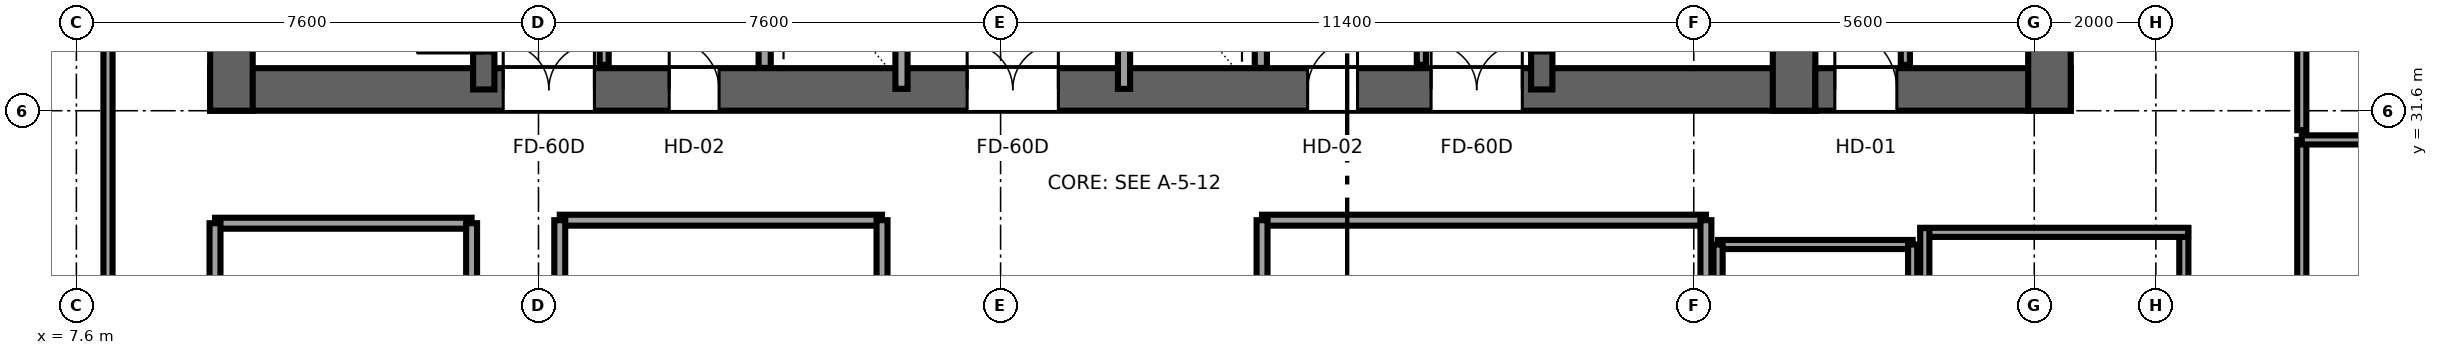
"""IFC4 building model, lengths in metres.
Left out: names, types, materials, properties, quantities, classifications, styles, units other than length and angle.
Written with IfcOpenShell. Run it as: python <this file> out.ifc"""

import sys

from ifc_helpers import new_model, si_unit, direction, frame, frame_2d, origin, place, context, subcontext, project, spatial, rectangle, extrude, source, transform, mapped, element, fill, save


model = new_model("IFC4")
c1 = context("Model", 3, precision=1e-05, world=origin(), true_north=direction((0.0, 1.0)))
c2 = subcontext(c1, "Body", "Model", "MODEL_VIEW")
j1 = project(units=[si_unit("LENGTHUNIT", "METRE"), si_unit("PLANEANGLEUNIT", "RADIAN")], contexts=[c1])
p1 = place(None, origin())
s1 = spatial("IfcSite", under=j1, at=p1, CompositionType="ELEMENT")
p2 = place(p1, origin())
s2 = spatial("IfcBuilding", under=s1, at=p2, CompositionType="ELEMENT")
p3 = place(p2, frame((0.0, 0.0, 115.1)))
s3 = spatial("IfcBuildingStorey", under=s2, at=p3, CompositionType="ELEMENT", Elevation=115.1)
p4 = place(p3, frame((9.8, 31.95, 0.0), z_axis=(0.0, 0.0, 1.0), x_axis=(1.0, 0.0, 0.0)))
e1 = element("IfcWall", 1, at=p4, inside=s3, PredefinedType="SHEAR", context=c2, shape_type="SweptSolid", body=[
    extrude(rectangle(XDim=26.4, YDim=0.7, at=frame_2d((13.2, 0.0))), origin(), (0.0, 0.0, 1.0), 3.55),
])
p5 = place(p4, frame((6.32, 0.0, 0.0), z_axis=(0.0, 0.0, 1.0), x_axis=(-1.0, 0.0, 0.0)))
e2 = element("IfcOpeningElement", 2, at=p5, cuts=e1, PredefinedType="OPENING", context=c2, shape_type="SweptSolid", body=[
    extrude(rectangle(XDim=1.5, YDim=2.04, at=frame_2d((0.75, 1.02))), frame((0.0, 0.36, 0.0), z_axis=(0.0, -1.0, 0.0), x_axis=(1.0, 0.0, 0.0)), (0.0, 0.0, 1.0), 0.72),
])
p6 = place(p4, frame((13.95, 0.0, 0.0), z_axis=(0.0, 0.0, 1.0), x_axis=(-1.0, 0.0, 0.0)))
e3 = element("IfcOpeningElement", 3, at=p6, cuts=e1, PredefinedType="OPENING", context=c2, shape_type="SweptSolid", body=[
    extrude(rectangle(XDim=1.5, YDim=2.04, at=frame_2d((0.75, 1.02))), frame((0.0, 0.36, 0.0), z_axis=(0.0, -1.0, 0.0), x_axis=(1.0, 0.0, 0.0)), (0.0, 0.0, 1.0), 0.72),
])
p7 = place(p4, frame((21.58, 0.0, 0.0), z_axis=(0.0, 0.0, 1.0), x_axis=(-1.0, 0.0, 0.0)))
e4 = element("IfcOpeningElement", 4, at=p7, cuts=e1, PredefinedType="OPENING", context=c2, shape_type="SweptSolid", body=[
    extrude(rectangle(XDim=1.5, YDim=2.04, at=frame_2d((0.75, 1.02))), frame((0.0, 0.36, 0.0), z_axis=(0.0, -1.0, 0.0), x_axis=(1.0, 0.0, 0.0)), (0.0, 0.0, 1.0), 0.72),
])
p8 = place(p4, frame((8.37, 0.0, 0.0), z_axis=(0.0, 0.0, 1.0), x_axis=(-1.0, 0.0, 0.0)))
e5 = element("IfcOpeningElement", 5, at=p8, cuts=e1, PredefinedType="OPENING", context=c2, shape_type="SweptSolid", body=[
    extrude(rectangle(XDim=0.82, YDim=2.01, at=frame_2d((0.41, 1.005))), frame((0.0, 0.36, 0.0), z_axis=(0.0, -1.0, 0.0), x_axis=(1.0, 0.0, 0.0)), (0.0, 0.0, 1.0), 0.72),
])
p9 = place(p4, frame((18.87, 0.0, 0.0), z_axis=(0.0, 0.0, 1.0), x_axis=(-1.0, 0.0, 0.0)))
e6 = element("IfcOpeningElement", 6, at=p9, cuts=e1, PredefinedType="OPENING", context=c2, shape_type="SweptSolid", body=[
    extrude(rectangle(XDim=0.82, YDim=2.01, at=frame_2d((0.41, 1.005))), frame((0.0, 0.36, 0.0), z_axis=(0.0, -1.0, 0.0), x_axis=(1.0, 0.0, 0.0)), (0.0, 0.0, 1.0), 0.72),
])
for number, where, z_axis, x_axis in (
    (7, (10.15, 31.6, 0.0), (0.0, 0.0, 1.0), (0.0, 1.0, 0.0)),
    (8, (35.85, 31.6, 0.0), (0.0, 0.0, 1.0), (0.0, 1.0, 0.0)),
):
    element("IfcWall", number, at=place(p3, frame(where, z_axis=z_axis, x_axis=x_axis)), inside=s3, PredefinedType="SHEAR", context=c2, shape_type="SweptSolid", body=[
        extrude(rectangle(XDim=13.6, YDim=0.7, at=frame_2d((6.8, 0.0))), origin(), (0.0, 0.0, 1.0), 3.55),
    ])
p10 = place(p3, frame((14.3, 31.95, 0.0), z_axis=(0.0, 0.0, 1.0), x_axis=(0.0, 1.0, 0.0)))
e9 = element("IfcWall", 9, at=p10, inside=s3, PredefinedType="SHEAR", context=c2, shape_type="SweptSolid", body=[
    extrude(rectangle(XDim=12.9, YDim=0.35, at=frame_2d((6.45, 0.0))), origin(), (0.0, 0.0, 1.0), 3.55),
])
p11 = place(p10, frame((0.6, 0.0, 0.0)))
e10 = element("IfcOpeningElement", 10, at=p11, cuts=e9, PredefinedType="OPENING", context=c2, shape_type="SweptSolid", body=[
    extrude(rectangle(XDim=1.1, YDim=2.12, at=frame_2d((0.55, 1.06))), frame((0.0, 0.185, 0.0), z_axis=(0.0, -1.0, 0.0), x_axis=(1.0, 0.0, 0.0)), (0.0, 0.0, 1.0), 0.37),
])
p12 = place(p3, frame((31.7, 31.95, 0.0), z_axis=(0.0, 0.0, 1.0), x_axis=(0.0, 1.0, 0.0)))
e11 = element("IfcWall", 11, at=p12, inside=s3, PredefinedType="SHEAR", context=c2, shape_type="SweptSolid", body=[
    extrude(rectangle(XDim=12.9, YDim=0.35, at=frame_2d((6.45, 0.0))), origin(), (0.0, 0.0, 1.0), 3.55),
])
p13 = place(p12, frame((1.7, 0.0, 0.0), z_axis=(0.0, 0.0, 1.0), x_axis=(-1.0, 0.0, 0.0)))
e12 = element("IfcOpeningElement", 12, at=p13, cuts=e11, PredefinedType="OPENING", context=c2, shape_type="SweptSolid", body=[
    extrude(rectangle(XDim=1.1, YDim=2.12, at=frame_2d((0.55, 1.06))), frame((0.0, 0.185, 0.0), z_axis=(0.0, -1.0, 0.0), x_axis=(1.0, 0.0, 0.0)), (0.0, 0.0, 1.0), 0.37),
])
p14 = place(p3, frame((36.2, 31.95, 0.0), z_axis=(0.0, 0.0, 1.0), x_axis=(1.0, 0.0, 0.0)))
e13 = element("IfcWall", 13, at=p14, inside=s3, PredefinedType="SHEAR", context=c2, shape_type="SweptSolid", body=[
    extrude(rectangle(XDim=4.2, YDim=0.7, at=frame_2d((2.1, 0.0))), origin(), (0.0, 0.0, 1.0), 3.55),
])
p15 = place(p14, frame((1.34, 0.0, 0.0), z_axis=(0.0, 0.0, 1.0), x_axis=(-1.0, 0.0, 0.0)))
e14 = element("IfcOpeningElement", 14, at=p15, cuts=e13, PredefinedType="OPENING", context=c2, shape_type="SweptSolid", body=[
    extrude(rectangle(XDim=1.02, YDim=2.03, at=frame_2d((0.51, 1.015))), frame((0.0, 0.36, 0.0), z_axis=(0.0, -1.0, 0.0), x_axis=(1.0, 0.0, 0.0)), (0.0, 0.0, 1.0), 0.72),
])
p16 = place(p3, frame((40.05, 31.6, 0.0), z_axis=(0.0, 0.0, 1.0), x_axis=(0.0, 1.0, 0.0)))
e15 = element("IfcWall", 15, at=p16, inside=s3, PredefinedType="SHEAR", context=c2, shape_type="SweptSolid", body=[
    extrude(rectangle(XDim=13.6, YDim=0.7, at=frame_2d((6.8, 0.0))), origin(), (0.0, 0.0, 1.0), 3.55),
])
for number, where, z_axis, x_axis in (
    (16, (18.92, 32.304, 0.0), (0.0, 0.0, 1.0), (0.0, 1.0, 0.0)),
    (17, (27.08, 32.304, 0.0), (0.0, 0.0, 1.0), (0.0, 1.0, 0.0)),
):
    element("IfcWall", number, at=place(p3, frame(where, z_axis=z_axis, x_axis=x_axis)), inside=s3, PredefinedType="SOLIDWALL", context=c2, shape_type="SweptSolid", body=[
        extrude(rectangle(XDim=3.846, YDim=0.2, at=frame_2d((1.923, 0.0))), origin(), (0.0, 0.0, 1.0), 3.37),
    ])
p17 = place(p3, frame((21.17, 31.96, 0.0), z_axis=(0.0, 0.0, 1.0), x_axis=(0.0, 1.0, 0.0)))
e18 = element("IfcWall", 18, at=p17, inside=s3, PredefinedType="SOLIDWALL", context=c2, shape_type="SweptSolid", body=[
    extrude(rectangle(XDim=12.58, YDim=0.2, at=frame_2d((6.29, 0.0))), origin(), (0.0, 0.0, 1.0), 3.37),
])
p18 = place(p17, frame((5.74, 0.0, 0.0)))
e19 = element("IfcOpeningElement", 19, at=p18, cuts=e18, PredefinedType="OPENING", context=c2, shape_type="SweptSolid", body=[
    extrude(rectangle(XDim=1.1, YDim=2.12, at=frame_2d((0.55, 1.06))), frame((0.0, 0.11, 0.0), z_axis=(0.0, -1.0, 0.0), x_axis=(1.0, 0.0, 0.0)), (0.0, 0.0, 1.0), 0.22),
])
p19 = place(p17, frame((8.24, 0.0, 0.0)))
e20 = element("IfcOpeningElement", 20, at=p19, cuts=e18, PredefinedType="OPENING", context=c2, shape_type="SweptSolid", body=[
    extrude(rectangle(XDim=1.1, YDim=2.12, at=frame_2d((0.55, 1.06))), frame((0.0, 0.11, 0.0), z_axis=(0.0, -1.0, 0.0), x_axis=(1.0, 0.0, 0.0)), (0.0, 0.0, 1.0), 0.22),
])
p20 = place(p3, frame((24.83, 31.96, 0.0), z_axis=(0.0, 0.0, 1.0), x_axis=(0.0, 1.0, 0.0)))
e21 = element("IfcWall", 21, at=p20, inside=s3, PredefinedType="SOLIDWALL", context=c2, shape_type="SweptSolid", body=[
    extrude(rectangle(XDim=12.58, YDim=0.2, at=frame_2d((6.29, 0.0))), origin(), (0.0, 0.0, 1.0), 3.37),
])
p21 = place(p20, frame((5.74, 0.0, 0.0)))
e22 = element("IfcOpeningElement", 22, at=p21, cuts=e21, PredefinedType="OPENING", context=c2, shape_type="SweptSolid", body=[
    extrude(rectangle(XDim=1.1, YDim=2.12, at=frame_2d((0.55, 1.06))), frame((0.0, 0.11, 0.0), z_axis=(0.0, -1.0, 0.0), x_axis=(1.0, 0.0, 0.0)), (0.0, 0.0, 1.0), 0.22),
])
p22 = place(p20, frame((8.24, 0.0, 0.0)))
e23 = element("IfcOpeningElement", 23, at=p22, cuts=e21, PredefinedType="OPENING", context=c2, shape_type="SweptSolid", body=[
    extrude(rectangle(XDim=1.1, YDim=2.12, at=frame_2d((0.55, 1.06))), frame((0.0, 0.11, 0.0), z_axis=(0.0, -1.0, 0.0), x_axis=(1.0, 0.0, 0.0)), (0.0, 0.0, 1.0), 0.22),
])
for number, where, z_axis, x_axis in (
    (24, (16.28, 32.355, 0.0), (0.0, 0.0, 1.0), (0.0, 1.0, 0.0)),
    (25, (29.72, 32.355, 0.0), (0.0, 0.0, 1.0), (0.0, 1.0, 0.0)),
):
    element("IfcWall", number, at=place(p3, frame(where, z_axis=z_axis, x_axis=x_axis)), inside=s3, PredefinedType="PARTITIONING", context=c2, shape_type="SweptSolid", body=[
        extrude(rectangle(XDim=0.865, YDim=0.15, at=frame_2d((0.433, 0.0))), origin(), (0.0, 0.0, 1.0), 3.37),
    ])
p23 = place(p3, frame((37.68, 32.355, 0.0), z_axis=(0.0, 0.0, 1.0), x_axis=(0.0, 1.0, 0.0)))
e26 = element("IfcWall", 26, at=p23, inside=s3, PredefinedType="PARTITIONING", context=c2, shape_type="SweptSolid", body=[
    extrude(rectangle(XDim=7.845, YDim=0.15, at=frame_2d((3.922, 0.0))), origin(), (0.0, 0.0, 1.0), 3.37),
])
p24 = place(p23, frame((3.413, 0.0, 0.0)))
e27 = element("IfcOpeningElement", 27, at=p24, cuts=e26, PredefinedType="OPENING", context=c2, shape_type="SweptSolid", body=[
    extrude(rectangle(XDim=1.02, YDim=2.03, at=frame_2d((0.51, 1.015))), frame((0.0, 0.085, 0.0), z_axis=(0.0, -1.0, 0.0), x_axis=(1.0, 0.0, 0.0)), (0.0, 0.0, 1.0), 0.17),
])
p25 = place(p3, frame((8.12, 21.78, 0.0), z_axis=(0.0, 0.0, 1.0), x_axis=(0.0, 1.0, 0.0)))
e28 = element("IfcWall", 28, at=p25, inside=s3, PredefinedType="PARTITIONING", context=c2, shape_type="SweptSolid", body=[
    extrude(rectangle(XDim=12.54, YDim=0.15, at=frame_2d((6.27, 0.0))), origin(), (0.0, 0.0, 1.0), 3.37),
])
p26 = place(p25, frame((5.78, 0.0, 0.0)))
e29 = element("IfcOpeningElement", 29, at=p26, cuts=e28, PredefinedType="OPENING", context=c2, shape_type="SweptSolid", body=[
    extrude(rectangle(XDim=0.98, YDim=2.12, at=frame_2d((0.49, 1.06))), frame((0.0, 0.085, 0.0), z_axis=(0.0, -1.0, 0.0), x_axis=(1.0, 0.0, 0.0)), (0.0, 0.0, 1.0), 0.17),
])
p27 = place(p3, frame((44.2, 21.78, 0.0), z_axis=(0.0, 0.0, 1.0), x_axis=(0.0, 1.0, 0.0)))
e30 = element("IfcWall", 30, at=p27, inside=s3, PredefinedType="PARTITIONING", context=c2, shape_type="SweptSolid", body=[
    extrude(rectangle(XDim=9.34, YDim=0.15, at=frame_2d((4.67, 0.0))), origin(), (0.0, 0.0, 1.0), 3.37),
])
p28 = place(p27, frame((4.18, 0.0, 0.0)))
e31 = element("IfcOpeningElement", 31, at=p28, cuts=e30, PredefinedType="OPENING", context=c2, shape_type="SweptSolid", body=[
    extrude(rectangle(XDim=0.98, YDim=2.12, at=frame_2d((0.49, 1.06))), frame((0.0, 0.085, 0.0), z_axis=(0.0, -1.0, 0.0), x_axis=(1.0, 0.0, 0.0)), (0.0, 0.0, 1.0), 0.17),
])
p29 = place(p3, frame((44.2, 31.12, 0.0), z_axis=(0.0, 0.0, 1.0), x_axis=(1.0, 0.0, 0.0)))
e32 = element("IfcWall", 32, at=p29, inside=s3, PredefinedType="PARTITIONING", context=c2, shape_type="SweptSolid", body=[
    extrude(rectangle(XDim=10.03, YDim=0.15, at=frame_2d((5.015, 0.0))), origin(), (0.0, 0.0, 1.0), 3.37),
])
p30 = place(p3, frame((44.2, 31.28, 0.0), z_axis=(0.0, 0.0, 1.0), x_axis=(0.0, 1.0, 0.0)))
e33 = element("IfcWall", 33, at=p30, inside=s3, PredefinedType="PARTITIONING", context=c2, shape_type="SweptSolid", body=[
    extrude(rectangle(XDim=6.24, YDim=0.15, at=frame_2d((3.12, 0.0))), origin(), (0.0, 0.0, 1.0), 3.37),
])
p31 = place(p30, frame((2.63, 0.0, 0.0)))
e34 = element("IfcOpeningElement", 34, at=p31, cuts=e33, PredefinedType="OPENING", context=c2, shape_type="SweptSolid", body=[
    extrude(rectangle(XDim=0.98, YDim=2.12, at=frame_2d((0.49, 1.06))), frame((0.0, 0.085, 0.0), z_axis=(0.0, -1.0, 0.0), x_axis=(1.0, 0.0, 0.0)), (0.0, 0.0, 1.0), 0.17),
])
p32 = place(p3, frame((42.26, 25.93, 0.0), z_axis=(0.0, 0.0, 1.0), x_axis=(0.0, 1.0, 0.0)))
e35 = element("IfcWall", 35, at=p32, inside=s3, PredefinedType="PARTITIONING", context=c2, shape_type="SweptSolid", body=[
    extrude(rectangle(XDim=3.74, YDim=0.15, at=frame_2d((1.87, 0.0))), origin(), (0.0, 0.0, 1.0), 3.37),
])
p33 = place(p32, frame((1.19, 0.0, 0.0)))
e36 = element("IfcOpeningElement", 36, at=p33, cuts=e35, PredefinedType="OPENING", context=c2, shape_type="SweptSolid", body=[
    extrude(rectangle(XDim=0.92, YDim=2.01, at=frame_2d((0.46, 1.005))), frame((0.0, 0.085, 0.0), z_axis=(0.0, -1.0, 0.0), x_axis=(1.0, 0.0, 0.0)), (0.0, 0.0, 1.0), 0.17),
])
p34 = place(p3, frame((37.93, 29.6, 0.0), z_axis=(0.0, 0.0, 1.0), x_axis=(1.0, 0.0, 0.0)))
e37 = element("IfcWall", 37, at=p34, inside=s3, PredefinedType="PARTITIONING", context=c2, shape_type="SweptSolid", body=[
    extrude(rectangle(XDim=4.4, YDim=0.15, at=frame_2d((2.2, 0.0))), origin(), (0.0, 0.0, 1.0), 3.37),
])
p35 = place(p3, frame((38.0, 25.93, 0.0), z_axis=(0.0, 0.0, 1.0), x_axis=(0.0, 1.0, 0.0)))
e38 = element("IfcWall", 38, at=p35, inside=s3, PredefinedType="PARTITIONING", context=c2, shape_type="SweptSolid", body=[
    extrude(rectangle(XDim=3.74, YDim=0.15, at=frame_2d((1.87, 0.0))), origin(), (0.0, 0.0, 1.0), 3.37),
])
p36 = place(p3, frame((9.88, 29.75, 0.0), z_axis=(0.0, 0.0, 1.0), x_axis=(1.0, 0.0, 0.0)))
e39 = element("IfcWall", 39, at=p36, inside=s3, PredefinedType="PARTITIONING", context=c2, shape_type="SweptSolid", body=[
    extrude(rectangle(XDim=4.22, YDim=0.18, at=frame_2d((2.11, 0.0))), origin(), (0.0, 0.0, 1.0), 3.37),
])
for number, where, z_axis, x_axis in (
    (40, (9.88, 21.7, 0.0), (0.0, 0.0, 1.0), (0.0, 1.0, 0.0)),
    (41, (14.1, 21.7, 0.0), (0.0, 0.0, 1.0), (0.0, 1.0, 0.0)),
):
    element("IfcWall", number, at=place(p3, frame(where, z_axis=z_axis, x_axis=x_axis)), inside=s3, PredefinedType="PARTITIONING", context=c2, shape_type="SweptSolid", body=[
        extrude(rectangle(XDim=8.05, YDim=0.18, at=frame_2d((4.025, 0.0))), origin(), (0.0, 0.0, 1.0), 3.37),
    ])
p37 = place(p3, frame((27.1, 29.8, 0.0), z_axis=(0.0, 0.0, 1.0), x_axis=(1.0, 0.0, 0.0)))
e42 = element("IfcWall", 42, at=p37, inside=s3, PredefinedType="PARTITIONING", context=c2, shape_type="SweptSolid", body=[
    extrude(rectangle(XDim=7.3, YDim=0.18, at=frame_2d((3.65, 0.0))), origin(), (0.0, 0.0, 1.0), 3.37),
])
for number, where, z_axis, x_axis in (
    (43, (27.1, 21.7, 0.0), (0.0, 0.0, 1.0), (0.0, 1.0, 0.0)),
    (44, (34.4, 21.7, 0.0), (0.0, 0.0, 1.0), (0.0, 1.0, 0.0)),
):
    element("IfcWall", number, at=place(p3, frame(where, z_axis=z_axis, x_axis=x_axis)), inside=s3, PredefinedType="PARTITIONING", context=c2, shape_type="SweptSolid", body=[
        extrude(rectangle(XDim=8.1, YDim=0.18, at=frame_2d((4.05, 0.0))), origin(), (0.0, 0.0, 1.0), 3.37),
    ])
p38 = place(p3, frame((15.55, 29.8, 0.0), z_axis=(0.0, 0.0, 1.0), x_axis=(1.0, 0.0, 0.0)))
e45 = element("IfcWall", 45, at=p38, inside=s3, PredefinedType="PARTITIONING", context=c2, shape_type="SweptSolid", body=[
    extrude(rectangle(XDim=5.3, YDim=0.18, at=frame_2d((2.65, 0.0))), origin(), (0.0, 0.0, 1.0), 3.37),
])
for number, where, z_axis, x_axis in (
    (46, (15.55, 21.7, 0.0), (0.0, 0.0, 1.0), (0.0, 1.0, 0.0)),
    (47, (20.85, 21.7, 0.0), (0.0, 0.0, 1.0), (0.0, 1.0, 0.0)),
):
    element("IfcWall", number, at=place(p3, frame(where, z_axis=z_axis, x_axis=x_axis)), inside=s3, PredefinedType="PARTITIONING", context=c2, shape_type="SweptSolid", body=[
        extrude(rectangle(XDim=8.1, YDim=0.18, at=frame_2d((4.05, 0.0))), origin(), (0.0, 0.0, 1.0), 3.37),
    ])
p39 = place(p3, frame((34.6, 29.4, 0.0), z_axis=(0.0, 0.0, 1.0), x_axis=(1.0, 0.0, 0.0)))
e48 = element("IfcWall", 48, at=p39, inside=s3, PredefinedType="PARTITIONING", context=c2, shape_type="SweptSolid", body=[
    extrude(rectangle(XDim=3.2, YDim=0.15, at=frame_2d((1.6, 0.0))), origin(), (0.0, 0.0, 1.0), 3.37),
])
for number, where, z_axis, x_axis in (
    (49, (34.6, 21.7, 0.0), (0.0, 0.0, 1.0), (0.0, 1.0, 0.0)),
    (50, (37.8, 21.7, 0.0), (0.0, 0.0, 1.0), (0.0, 1.0, 0.0)),
):
    element("IfcWall", number, at=place(p3, frame(where, z_axis=z_axis, x_axis=x_axis)), inside=s3, PredefinedType="PARTITIONING", context=c2, shape_type="SweptSolid", body=[
        extrude(rectangle(XDim=7.7, YDim=0.15, at=frame_2d((3.85, 0.0))), origin(), (0.0, 0.0, 1.0), 3.37),
    ])
m1 = source(origin(), c2, "Body", "SweptSolid", [
    extrude(rectangle(XDim=1.1, YDim=2.12, at=frame_2d((0.55, 1.06))), frame((0.0, 0.025, 0.0), z_axis=(0.0, -1.0, 0.0), x_axis=(1.0, 0.0, 0.0)), (0.0, 0.0, 1.0), 0.05),
])
p40 = place(p11, origin())
e51 = element("IfcDoor", 51, at=p40, inside=s3, OperationType="SINGLE_SWING_LEFT", PredefinedType="DOOR", context=c2, shape_type="MappedRepresentation", body=[
    mapped(m1, transform((0.0, 0.0, 0.0), x_axis=(1.0, 0.0, 0.0), y_axis=(0.0, 1.0, 0.0), z_axis=(0.0, 0.0, 1.0), scale=1.0)),
])
fill(e10, e51)
p41 = place(p13, origin())
e52 = element("IfcDoor", 52, at=p41, inside=s3, OperationType="SINGLE_SWING_RIGHT", PredefinedType="DOOR", context=c2, shape_type="MappedRepresentation", body=[
    mapped(m1, transform((0.0, 0.0, 0.0), x_axis=(1.0, 0.0, 0.0), y_axis=(0.0, 1.0, 0.0), z_axis=(0.0, 0.0, 1.0), scale=1.0)),
])
fill(e12, e52)
m2 = source(origin(), c2, "Body", "SweptSolid", [
    extrude(rectangle(XDim=1.5, YDim=2.04, at=frame_2d((0.75, 1.02))), frame((0.0, 0.025, 0.0), z_axis=(0.0, -1.0, 0.0), x_axis=(1.0, 0.0, 0.0)), (0.0, 0.0, 1.0), 0.05),
])
p42 = place(p5, origin())
e53 = element("IfcDoor", 53, at=p42, inside=s3, OperationType="DOUBLE_DOOR_SINGLE_SWING", PredefinedType="DOOR", context=c2, shape_type="MappedRepresentation", body=[
    mapped(m2, transform((0.0, 0.0, 0.0), x_axis=(1.0, 0.0, 0.0), y_axis=(0.0, 1.0, 0.0), z_axis=(0.0, 0.0, 1.0), scale=1.0)),
])
fill(e2, e53)
p43 = place(p6, origin())
e54 = element("IfcDoor", 54, at=p43, inside=s3, OperationType="DOUBLE_DOOR_SINGLE_SWING", PredefinedType="DOOR", context=c2, shape_type="MappedRepresentation", body=[
    mapped(m2, transform((0.0, 0.0, 0.0), x_axis=(1.0, 0.0, 0.0), y_axis=(0.0, 1.0, 0.0), z_axis=(0.0, 0.0, 1.0), scale=1.0)),
])
fill(e3, e54)
p44 = place(p7, origin())
e55 = element("IfcDoor", 55, at=p44, inside=s3, OperationType="DOUBLE_DOOR_SINGLE_SWING", PredefinedType="DOOR", context=c2, shape_type="MappedRepresentation", body=[
    mapped(m2, transform((0.0, 0.0, 0.0), x_axis=(1.0, 0.0, 0.0), y_axis=(0.0, 1.0, 0.0), z_axis=(0.0, 0.0, 1.0), scale=1.0)),
])
fill(e4, e55)
m3 = source(origin(), c2, "Body", "SweptSolid", [
    extrude(rectangle(XDim=0.82, YDim=2.01, at=frame_2d((0.41, 1.005))), frame((0.0, 0.025, 0.0), z_axis=(0.0, -1.0, 0.0), x_axis=(1.0, 0.0, 0.0)), (0.0, 0.0, 1.0), 0.05),
])
p45 = place(p8, origin())
e56 = element("IfcDoor", 56, at=p45, inside=s3, OperationType="SINGLE_SWING_LEFT", PredefinedType="DOOR", context=c2, shape_type="MappedRepresentation", body=[
    mapped(m3, transform((0.0, 0.0, 0.0), x_axis=(1.0, 0.0, 0.0), y_axis=(0.0, 1.0, 0.0), z_axis=(0.0, 0.0, 1.0), scale=1.0)),
])
fill(e5, e56)
p46 = place(p9, origin())
e57 = element("IfcDoor", 57, at=p46, inside=s3, OperationType="SINGLE_SWING_RIGHT", PredefinedType="DOOR", context=c2, shape_type="MappedRepresentation", body=[
    mapped(m3, transform((0.0, 0.0, 0.0), x_axis=(1.0, 0.0, 0.0), y_axis=(0.0, 1.0, 0.0), z_axis=(0.0, 0.0, 1.0), scale=1.0)),
])
fill(e6, e57)
m4 = source(origin(), c2, "Body", "SweptSolid", [
    extrude(rectangle(XDim=1.02, YDim=2.03, at=frame_2d((0.51, 1.015))), frame((0.0, 0.025, 0.0), z_axis=(0.0, -1.0, 0.0), x_axis=(1.0, 0.0, 0.0)), (0.0, 0.0, 1.0), 0.05),
])
p47 = place(p15, origin())
e58 = element("IfcDoor", 58, at=p47, inside=s3, OperationType="SINGLE_SWING_LEFT", PredefinedType="DOOR", context=c2, shape_type="MappedRepresentation", body=[
    mapped(m4, transform((0.0, 0.0, 0.0), x_axis=(1.0, 0.0, 0.0), y_axis=(0.0, 1.0, 0.0), z_axis=(0.0, 0.0, 1.0), scale=1.0)),
])
fill(e14, e58)
save(model, sys.argv[1])
